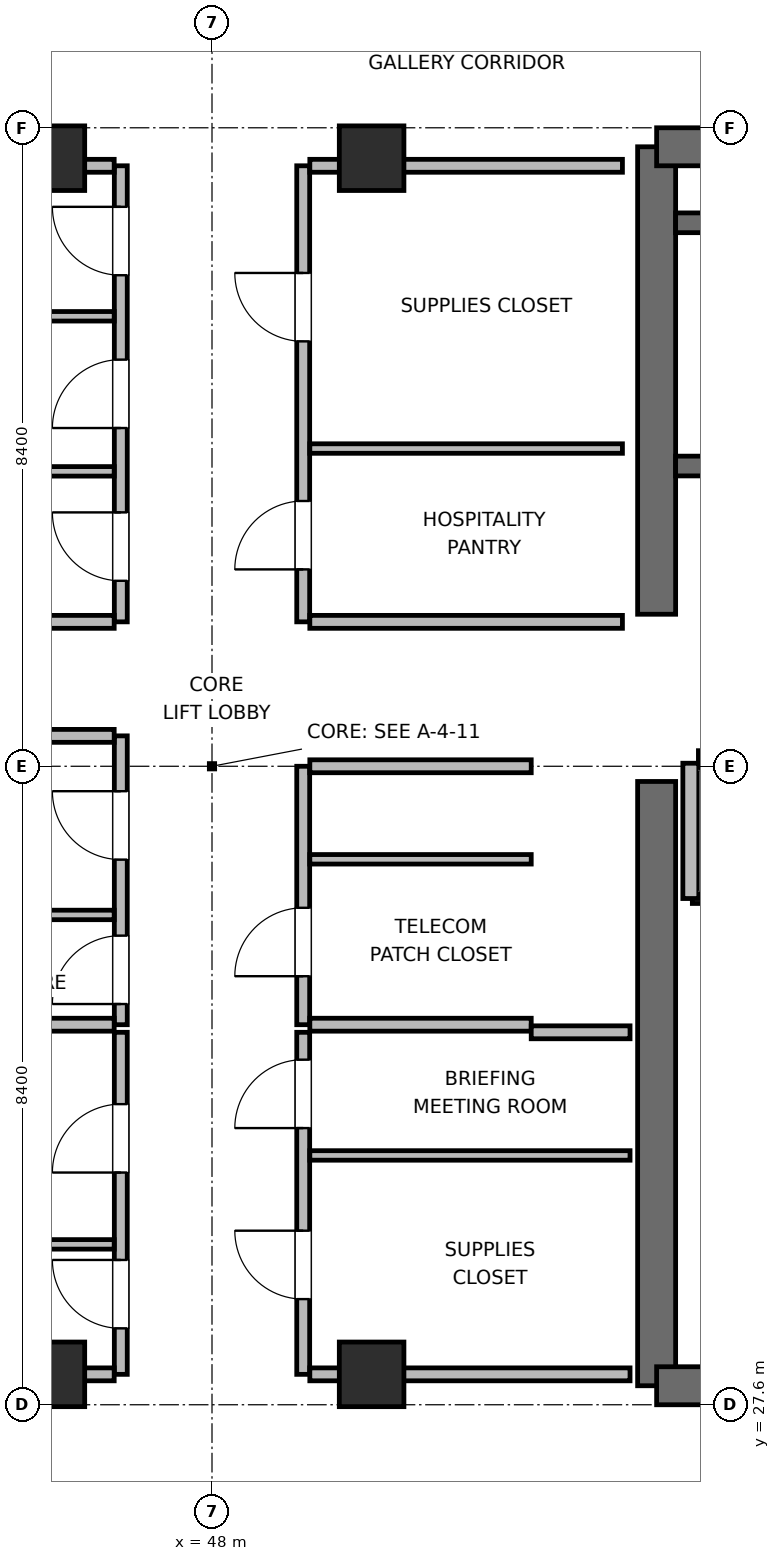
"""IFC4 building model, lengths in metres.
Left out: names, types, materials, properties, quantities, classifications, styles, units other than length and angle.
Written with IfcOpenShell. Run it as: python <this file> out.ifc"""

import sys

from ifc_helpers import new_model, si_unit, direction, frame, frame_2d, origin, origin_2d, place, context, subcontext, project, spatial, rectangle, extrude, element, fill, save


model = new_model("IFC4")
c1 = context("Model", 3, precision=1e-05, world=origin(), true_north=direction((0.0, 1.0)))
c2 = subcontext(c1, "Body", "Model", "MODEL_VIEW")
j1 = project(units=[si_unit("LENGTHUNIT", "METRE"), si_unit("PLANEANGLEUNIT", "RADIAN")], contexts=[c1])
p1 = place(None, origin())
s1 = spatial("IfcSite", under=j1, at=p1, CompositionType="ELEMENT")
p2 = place(p1, origin())
s2 = spatial("IfcBuilding", under=s1, at=p2, CompositionType="ELEMENT")
p3 = place(p2, frame((0.0, 0.0, 278.4)))
s3 = spatial("IfcBuildingStorey", under=s2, at=p3, CompositionType="ELEMENT", Elevation=278.4)
p4 = place(p3, frame((53.85, 27.85, 0.0), z_axis=(0.0, 0.0, 1.0), x_axis=(0.0, 1.0, 0.0)))
e1 = element("IfcWall", 1, at=p4, inside=s3, PredefinedType="SHEAR", context=c2, shape_type="SweptSolid", body=[
    extrude(rectangle(XDim=7.95, YDim=0.5, at=frame_2d((3.975, 0.0))), origin(), (0.0, 0.0, 1.0), 3.9),
])
p5 = place(p3, frame((53.85, 38.0, 0.0), z_axis=(0.0, 0.0, 1.0), x_axis=(0.0, 1.0, 0.0)))
e2 = element("IfcWall", 2, at=p5, inside=s3, PredefinedType="SHEAR", context=c2, shape_type="SweptSolid", body=[
    extrude(rectangle(XDim=6.15, YDim=0.5, at=frame_2d((3.075, 0.0))), origin(), (0.0, 0.0, 1.0), 3.9),
])
p6 = place(p3, frame((53.85, 27.85, 0.0), z_axis=(0.0, 0.0, 1.0), x_axis=(1.0, 0.0, 0.0)))
e3 = element("IfcWall", 3, at=p6, inside=s3, PredefinedType="SHEAR", context=c2, shape_type="SweptSolid", body=[
    extrude(rectangle(XDim=9.5, YDim=0.5, at=frame_2d((4.75, 0.0))), origin(), (0.0, 0.0, 1.0), 3.9),
])
p7 = place(p6, frame((4.025, 0.0, 0.0)))
e4 = element("IfcOpeningElement", 4, at=p7, cuts=e3, PredefinedType="OPENING", context=c2, shape_type="SweptSolid", body=[
    extrude(rectangle(XDim=1.05, YDim=2.04, at=frame_2d((0.525, 1.02))), frame((0.0, 0.26, 0.0), z_axis=(0.0, -1.0, 0.0), x_axis=(1.0, 0.0, 0.0)), (0.0, 0.0, 1.0), 0.52),
])
p8 = place(p3, frame((53.85, 44.15, 0.0), z_axis=(0.0, 0.0, 1.0), x_axis=(1.0, 0.0, 0.0)))
e5 = element("IfcWall", 5, at=p8, inside=s3, PredefinedType="SHEAR", context=c2, shape_type="SweptSolid", body=[
    extrude(rectangle(XDim=9.5, YDim=0.5, at=frame_2d((4.75, 0.0))), origin(), (0.0, 0.0, 1.0), 3.9),
])
p9 = place(p3, frame((54.1, 39.95, 0.0), z_axis=(0.0, 0.0, 1.0), x_axis=(1.0, 0.0, 0.0)))
e6 = element("IfcWall", 6, at=p9, inside=s3, PredefinedType="SHEAR", context=c2, shape_type="SweptSolid", body=[
    extrude(rectangle(XDim=9.0, YDim=0.26, at=frame_2d((4.5, 0.0))), origin(), (0.0, 0.0, 1.0), 3.9),
])
p10 = place(p9, frame((1.1, 0.0, 0.0)))
e7 = element("IfcOpeningElement", 7, at=p10, cuts=e6, PredefinedType="OPENING", context=c2, shape_type="SweptSolid", body=[
    extrude(rectangle(XDim=1.0, YDim=2.04, at=frame_2d((0.5, 1.02))), frame((0.0, 0.14, 0.0), z_axis=(0.0, -1.0, 0.0), x_axis=(1.0, 0.0, 0.0)), (0.0, 0.0, 1.0), 0.28),
])
p11 = place(p3, frame((54.1, 43.15, 0.0), z_axis=(0.0, 0.0, 1.0), x_axis=(1.0, 0.0, 0.0)))
e8 = element("IfcWall", 8, at=p11, inside=s3, PredefinedType="SHEAR", context=c2, shape_type="SweptSolid", body=[
    extrude(rectangle(XDim=9.0, YDim=0.26, at=frame_2d((4.5, 0.0))), origin(), (0.0, 0.0, 1.0), 3.9),
])
for number, where, z_axis, x_axis in (
    (9, (45.9, 28.0, 0.0), (0.0, 0.0, 1.0), (1.0, 0.0, 0.0)),
    (10, (50.1, 28.0, 0.0), (0.0, 0.0, 1.0), (1.0, 0.0, 0.0)),
    (11, (45.9, 44.0, 0.0), (0.0, 0.0, 1.0), (1.0, 0.0, 0.0)),
    (12, (50.1, 44.0, 0.0), (0.0, 0.0, 1.0), (1.0, 0.0, 0.0)),
):
    element("IfcColumn", number, at=place(p3, frame(where, z_axis=z_axis, x_axis=x_axis)), inside=s3, PredefinedType="COLUMN", context=c2, shape_type="SweptSolid", body=[
        extrude(rectangle(XDim=0.85, YDim=0.85, at=origin_2d()), origin(), (0.0, 0.0, 1.0), 3.9),
    ])
p12 = place(p3, frame((54.32, 34.3, 0.0), z_axis=(0.0, 0.0, 1.0), x_axis=(1.0, 0.0, 0.0)))
e13 = element("IfcWall", 13, at=p12, inside=s3, PredefinedType="PARTITIONING", context=c2, shape_type="SweptSolid", body=[
    extrude(rectangle(XDim=3.48, YDim=0.21, at=frame_2d((1.74, 0.0))), origin(), (0.0, 0.0, 1.0), 3.6),
])
p13 = place(p3, frame((54.4, 36.1, 0.0), z_axis=(0.0, 0.0, 1.0), x_axis=(1.0, 0.0, 0.0)))
e14 = element("IfcWall", 14, at=p13, inside=s3, PredefinedType="PARTITIONING", context=c2, shape_type="SweptSolid", body=[
    extrude(rectangle(XDim=2.1, YDim=0.21, at=frame_2d((1.05, 0.0))), origin(), (0.0, 0.0, 1.0), 3.6),
])
p14 = place(p13, frame((0.5, 0.0, 0.0)))
e15 = element("IfcOpeningElement", 15, at=p14, cuts=e14, PredefinedType="OPENING", context=c2, shape_type="SweptSolid", body=[
    extrude(rectangle(XDim=1.1, YDim=2.04, at=frame_2d((0.55, 1.02))), frame((0.0, 0.115, 0.0), z_axis=(0.0, -1.0, 0.0), x_axis=(1.0, 0.0, 0.0)), (0.0, 0.0, 1.0), 0.23),
])
p15 = place(p3, frame((54.3, 34.26, 0.0), z_axis=(0.0, 0.0, 1.0), x_axis=(0.0, 1.0, 0.0)))
e16 = element("IfcWall", 16, at=p15, inside=s3, PredefinedType="PARTITIONING", context=c2, shape_type="SweptSolid", body=[
    extrude(rectangle(XDim=1.78, YDim=0.21, at=frame_2d((0.89, 0.0))), origin(), (0.0, 0.0, 1.0), 3.6),
])
p16 = place(p3, frame((46.8, 32.6, 0.0), z_axis=(0.0, 0.0, 1.0), x_axis=(0.0, 1.0, 0.0)))
e17 = element("IfcWall", 17, at=p16, inside=s3, PredefinedType="PARTITIONING", context=c2, shape_type="SweptSolid", body=[
    extrude(rectangle(XDim=3.8, YDim=0.17, at=frame_2d((1.9, 0.0))), origin(), (0.0, 0.0, 1.0), 3.6),
])
p17 = place(p16, frame((0.272, 0.0, 0.0)))
e18 = element("IfcOpeningElement", 18, at=p17, cuts=e17, PredefinedType="OPENING", context=c2, shape_type="SweptSolid", body=[
    extrude(rectangle(XDim=0.9, YDim=2.02, at=frame_2d((0.45, 1.01))), frame((0.0, 0.095, 0.0), z_axis=(0.0, -1.0, 0.0), x_axis=(1.0, 0.0, 0.0)), (0.0, 0.0, 1.0), 0.19),
])
p18 = place(p16, frame((2.172, 0.0, 0.0)))
e19 = element("IfcOpeningElement", 19, at=p18, cuts=e17, PredefinedType="OPENING", context=c2, shape_type="SweptSolid", body=[
    extrude(rectangle(XDim=0.9, YDim=2.02, at=frame_2d((0.45, 1.01))), frame((0.0, 0.095, 0.0), z_axis=(0.0, -1.0, 0.0), x_axis=(1.0, 0.0, 0.0)), (0.0, 0.0, 1.0), 0.19),
])
for number, where, z_axis, x_axis in (
    (20, (43.8, 32.6, 0.0), (0.0, 0.0, 1.0), (1.0, 0.0, 0.0)),
    (21, (43.8, 36.4, 0.0), (0.0, 0.0, 1.0), (1.0, 0.0, 0.0)),
):
    element("IfcWall", number, at=place(p3, frame(where, z_axis=z_axis, x_axis=x_axis)), inside=s3, PredefinedType="PARTITIONING", context=c2, shape_type="SweptSolid", body=[
        extrude(rectangle(XDim=2.913, YDim=0.17, at=frame_2d((1.457, 0.0))), origin(), (0.0, 0.0, 1.0), 3.6),
    ])
p19 = place(p3, frame((43.8, 34.044, 0.0), z_axis=(0.0, 0.0, 1.0), x_axis=(1.0, 0.0, 0.0)))
e22 = element("IfcWall", 22, at=p19, inside=s3, PredefinedType="PARTITIONING", context=c2, shape_type="SweptSolid", body=[
    extrude(rectangle(XDim=2.913, YDim=0.125, at=frame_2d((1.457, 0.0))), origin(), (0.0, 0.0, 1.0), 3.6),
])
p20 = place(p3, frame((49.2, 32.6, 0.0), z_axis=(0.0, 0.0, 1.0), x_axis=(0.0, 1.0, 0.0)))
e23 = element("IfcWall", 23, at=p20, inside=s3, PredefinedType="PARTITIONING", context=c2, shape_type="SweptSolid", body=[
    extrude(rectangle(XDim=3.4, YDim=0.17, at=frame_2d((1.7, 0.0))), origin(), (0.0, 0.0, 1.0), 3.6),
])
p21 = place(p20, frame((0.638, 0.0, 0.0)))
e24 = element("IfcOpeningElement", 24, at=p21, cuts=e23, PredefinedType="OPENING", context=c2, shape_type="SweptSolid", body=[
    extrude(rectangle(XDim=0.9, YDim=2.02, at=frame_2d((0.45, 1.01))), frame((0.0, 0.095, 0.0), z_axis=(0.0, -1.0, 0.0), x_axis=(1.0, 0.0, 0.0)), (0.0, 0.0, 1.0), 0.19),
])
for number, where, z_axis, x_axis in (
    (25, (49.287, 32.6, 0.0), (0.0, 0.0, 1.0), (1.0, 0.0, 0.0)),
    (26, (49.287, 36.0, 0.0), (0.0, 0.0, 1.0), (1.0, 0.0, 0.0)),
):
    element("IfcWall", number, at=place(p3, frame(where, z_axis=z_axis, x_axis=x_axis)), inside=s3, PredefinedType="PARTITIONING", context=c2, shape_type="SweptSolid", body=[
        extrude(rectangle(XDim=2.913, YDim=0.17, at=frame_2d((1.457, 0.0))), origin(), (0.0, 0.0, 1.0), 3.6),
    ])
p22 = place(p3, frame((49.287, 34.776, 0.0), z_axis=(0.0, 0.0, 1.0), x_axis=(1.0, 0.0, 0.0)))
e27 = element("IfcWall", 27, at=p22, inside=s3, PredefinedType="PARTITIONING", context=c2, shape_type="SweptSolid", body=[
    extrude(rectangle(XDim=2.913, YDim=0.125, at=frame_2d((1.457, 0.0))), origin(), (0.0, 0.0, 1.0), 3.6),
])
p23 = place(p3, frame((46.8, 28.0, 0.0), z_axis=(0.0, 0.0, 1.0), x_axis=(0.0, 1.0, 0.0)))
e28 = element("IfcWall", 28, at=p23, inside=s3, PredefinedType="PARTITIONING", context=c2, shape_type="SweptSolid", body=[
    extrude(rectangle(XDim=4.5, YDim=0.17, at=frame_2d((2.25, 0.0))), origin(), (0.0, 0.0, 1.0), 3.6),
])
p24 = place(p23, frame((0.605, 0.0, 0.0)))
e29 = element("IfcOpeningElement", 29, at=p24, cuts=e28, PredefinedType="OPENING", context=c2, shape_type="SweptSolid", body=[
    extrude(rectangle(XDim=0.9, YDim=2.02, at=frame_2d((0.45, 1.01))), frame((0.0, 0.095, 0.0), z_axis=(0.0, -1.0, 0.0), x_axis=(1.0, 0.0, 0.0)), (0.0, 0.0, 1.0), 0.19),
])
p25 = place(p23, frame((2.655, 0.0, 0.0)))
e30 = element("IfcOpeningElement", 30, at=p25, cuts=e28, PredefinedType="OPENING", context=c2, shape_type="SweptSolid", body=[
    extrude(rectangle(XDim=0.9, YDim=2.02, at=frame_2d((0.45, 1.01))), frame((0.0, 0.095, 0.0), z_axis=(0.0, -1.0, 0.0), x_axis=(1.0, 0.0, 0.0)), (0.0, 0.0, 1.0), 0.19),
])
p26 = place(p3, frame((42.5, 28.0, 0.0), z_axis=(0.0, 0.0, 1.0), x_axis=(1.0, 0.0, 0.0)))
e31 = element("IfcWall", 31, at=p26, inside=s3, PredefinedType="PARTITIONING", context=c2, shape_type="SweptSolid", body=[
    extrude(rectangle(XDim=4.213, YDim=0.17, at=frame_2d((2.106, 0.0))), origin(), (0.0, 0.0, 1.0), 2.685),
])
p27 = place(p3, frame((42.5, 29.71, 0.0), z_axis=(0.0, 0.0, 1.0), x_axis=(1.0, 0.0, 0.0)))
e32 = element("IfcWall", 32, at=p27, inside=s3, PredefinedType="PARTITIONING", context=c2, shape_type="SweptSolid", body=[
    extrude(rectangle(XDim=4.213, YDim=0.125, at=frame_2d((2.106, 0.0))), origin(), (0.0, 0.0, 1.0), 3.6),
])
p28 = place(p3, frame((49.2, 28.0, 0.0), z_axis=(0.0, 0.0, 1.0), x_axis=(0.0, 1.0, 0.0)))
e33 = element("IfcWall", 33, at=p28, inside=s3, PredefinedType="PARTITIONING", context=c2, shape_type="SweptSolid", body=[
    extrude(rectangle(XDim=4.5, YDim=0.17, at=frame_2d((2.25, 0.0))), origin(), (0.0, 0.0, 1.0), 3.6),
])
p29 = place(p28, frame((0.99, 0.0, 0.0)))
e34 = element("IfcOpeningElement", 34, at=p29, cuts=e33, PredefinedType="OPENING", context=c2, shape_type="SweptSolid", body=[
    extrude(rectangle(XDim=0.9, YDim=2.02, at=frame_2d((0.45, 1.01))), frame((0.0, 0.095, 0.0), z_axis=(0.0, -1.0, 0.0), x_axis=(1.0, 0.0, 0.0)), (0.0, 0.0, 1.0), 0.19),
])
p30 = place(p28, frame((3.24, 0.0, 0.0)))
e35 = element("IfcOpeningElement", 35, at=p30, cuts=e33, PredefinedType="OPENING", context=c2, shape_type="SweptSolid", body=[
    extrude(rectangle(XDim=0.9, YDim=2.02, at=frame_2d((0.45, 1.01))), frame((0.0, 0.095, 0.0), z_axis=(0.0, -1.0, 0.0), x_axis=(1.0, 0.0, 0.0)), (0.0, 0.0, 1.0), 0.19),
])
p31 = place(p3, frame((49.287, 28.0, 0.0), z_axis=(0.0, 0.0, 1.0), x_axis=(1.0, 0.0, 0.0)))
e36 = element("IfcWall", 36, at=p31, inside=s3, PredefinedType="PARTITIONING", context=c2, shape_type="SweptSolid", body=[
    extrude(rectangle(XDim=4.213, YDim=0.17, at=frame_2d((2.106, 0.0))), origin(), (0.0, 0.0, 1.0), 2.685),
])
p32 = place(p3, frame((52.2, 32.5, 0.0), z_axis=(0.0, 0.0, 1.0), x_axis=(1.0, 0.0, 0.0)))
e37 = element("IfcWall", 37, at=p32, inside=s3, PredefinedType="PARTITIONING", context=c2, shape_type="SweptSolid", body=[
    extrude(rectangle(XDim=1.3, YDim=0.17, at=frame_2d((0.65, 0.0))), origin(), (0.0, 0.0, 1.0), 3.6),
])
p33 = place(p3, frame((49.287, 30.88, 0.0), z_axis=(0.0, 0.0, 1.0), x_axis=(1.0, 0.0, 0.0)))
e38 = element("IfcWall", 38, at=p33, inside=s3, PredefinedType="PARTITIONING", context=c2, shape_type="SweptSolid", body=[
    extrude(rectangle(XDim=4.213, YDim=0.125, at=frame_2d((2.106, 0.0))), origin(), (0.0, 0.0, 1.0), 3.6),
])
p34 = place(p3, frame((46.8, 37.9, 0.0), z_axis=(0.0, 0.0, 1.0), x_axis=(0.0, 1.0, 0.0)))
e39 = element("IfcWall", 39, at=p34, inside=s3, PredefinedType="PARTITIONING", context=c2, shape_type="SweptSolid", body=[
    extrude(rectangle(XDim=6.0, YDim=0.17, at=frame_2d((3.0, 0.0))), origin(), (0.0, 0.0, 1.0), 3.6),
])
p35 = place(p34, frame((0.54, 0.0, 0.0)))
e40 = element("IfcOpeningElement", 40, at=p35, cuts=e39, PredefinedType="OPENING", context=c2, shape_type="SweptSolid", body=[
    extrude(rectangle(XDim=0.9, YDim=2.02, at=frame_2d((0.45, 1.01))), frame((0.0, 0.095, 0.0), z_axis=(0.0, -1.0, 0.0), x_axis=(1.0, 0.0, 0.0)), (0.0, 0.0, 1.0), 0.19),
])
p36 = place(p34, frame((2.55, 0.0, 0.0)))
e41 = element("IfcOpeningElement", 41, at=p36, cuts=e39, PredefinedType="OPENING", context=c2, shape_type="SweptSolid", body=[
    extrude(rectangle(XDim=0.9, YDim=2.02, at=frame_2d((0.45, 1.01))), frame((0.0, 0.095, 0.0), z_axis=(0.0, -1.0, 0.0), x_axis=(1.0, 0.0, 0.0)), (0.0, 0.0, 1.0), 0.19),
])
p37 = place(p34, frame((4.56, 0.0, 0.0)))
e42 = element("IfcOpeningElement", 42, at=p37, cuts=e39, PredefinedType="OPENING", context=c2, shape_type="SweptSolid", body=[
    extrude(rectangle(XDim=0.9, YDim=2.02, at=frame_2d((0.45, 1.01))), frame((0.0, 0.095, 0.0), z_axis=(0.0, -1.0, 0.0), x_axis=(1.0, 0.0, 0.0)), (0.0, 0.0, 1.0), 0.19),
])
p38 = place(p3, frame((42.5, 37.9, 0.0), z_axis=(0.0, 0.0, 1.0), x_axis=(1.0, 0.0, 0.0)))
e43 = element("IfcWall", 43, at=p38, inside=s3, PredefinedType="PARTITIONING", context=c2, shape_type="SweptSolid", body=[
    extrude(rectangle(XDim=4.213, YDim=0.17, at=frame_2d((2.106, 0.0))), origin(), (0.0, 0.0, 1.0), 3.6),
])
p39 = place(p3, frame((42.5, 43.9, 0.0), z_axis=(0.0, 0.0, 1.0), x_axis=(1.0, 0.0, 0.0)))
e44 = element("IfcWall", 44, at=p39, inside=s3, PredefinedType="PARTITIONING", context=c2, shape_type="SweptSolid", body=[
    extrude(rectangle(XDim=4.213, YDim=0.17, at=frame_2d((2.106, 0.0))), origin(), (0.0, 0.0, 1.0), 2.685),
])
for number, where, z_axis, x_axis in (
    (45, (42.5, 39.88, 0.0), (0.0, 0.0, 1.0), (1.0, 0.0, 0.0)),
    (46, (42.5, 41.92, 0.0), (0.0, 0.0, 1.0), (1.0, 0.0, 0.0)),
):
    element("IfcWall", number, at=place(p3, frame(where, z_axis=z_axis, x_axis=x_axis)), inside=s3, PredefinedType="PARTITIONING", context=c2, shape_type="SweptSolid", body=[
        extrude(rectangle(XDim=4.213, YDim=0.125, at=frame_2d((2.106, 0.0))), origin(), (0.0, 0.0, 1.0), 3.6),
    ])
p40 = place(p3, frame((49.2, 37.9, 0.0), z_axis=(0.0, 0.0, 1.0), x_axis=(0.0, 1.0, 0.0)))
e47 = element("IfcWall", 47, at=p40, inside=s3, PredefinedType="PARTITIONING", context=c2, shape_type="SweptSolid", body=[
    extrude(rectangle(XDim=6.0, YDim=0.17, at=frame_2d((3.0, 0.0))), origin(), (0.0, 0.0, 1.0), 3.6),
])
p41 = place(p40, frame((0.69, 0.0, 0.0)))
e48 = element("IfcOpeningElement", 48, at=p41, cuts=e47, PredefinedType="OPENING", context=c2, shape_type="SweptSolid", body=[
    extrude(rectangle(XDim=0.9, YDim=2.02, at=frame_2d((0.45, 1.01))), frame((0.0, 0.095, 0.0), z_axis=(0.0, -1.0, 0.0), x_axis=(1.0, 0.0, 0.0)), (0.0, 0.0, 1.0), 0.19),
])
p42 = place(p40, frame((3.69, 0.0, 0.0)))
e49 = element("IfcOpeningElement", 49, at=p42, cuts=e47, PredefinedType="OPENING", context=c2, shape_type="SweptSolid", body=[
    extrude(rectangle(XDim=0.9, YDim=2.02, at=frame_2d((0.45, 1.01))), frame((0.0, 0.095, 0.0), z_axis=(0.0, -1.0, 0.0), x_axis=(1.0, 0.0, 0.0)), (0.0, 0.0, 1.0), 0.19),
])
p43 = place(p3, frame((49.287, 37.9, 0.0), z_axis=(0.0, 0.0, 1.0), x_axis=(1.0, 0.0, 0.0)))
e50 = element("IfcWall", 50, at=p43, inside=s3, PredefinedType="PARTITIONING", context=c2, shape_type="SweptSolid", body=[
    extrude(rectangle(XDim=4.113, YDim=0.17, at=frame_2d((2.056, 0.0))), origin(), (0.0, 0.0, 1.0), 3.6),
])
p44 = place(p3, frame((49.287, 43.9, 0.0), z_axis=(0.0, 0.0, 1.0), x_axis=(1.0, 0.0, 0.0)))
e51 = element("IfcWall", 51, at=p44, inside=s3, PredefinedType="PARTITIONING", context=c2, shape_type="SweptSolid", body=[
    extrude(rectangle(XDim=4.113, YDim=0.17, at=frame_2d((2.056, 0.0))), origin(), (0.0, 0.0, 1.0), 2.685),
])
p45 = place(p3, frame((49.287, 40.18, 0.0), z_axis=(0.0, 0.0, 1.0), x_axis=(1.0, 0.0, 0.0)))
e52 = element("IfcWall", 52, at=p45, inside=s3, PredefinedType="PARTITIONING", context=c2, shape_type="SweptSolid", body=[
    extrude(rectangle(XDim=4.113, YDim=0.125, at=frame_2d((2.056, 0.0))), origin(), (0.0, 0.0, 1.0), 3.6),
])
p46 = place(p17, origin())
e53 = element("IfcDoor", 53, at=p46, inside=s3, OperationType="SINGLE_SWING_LEFT", PredefinedType="DOOR", context=c2, shape_type="SweptSolid", body=[
    extrude(rectangle(XDim=0.9, YDim=2.02, at=frame_2d((0.45, 1.01))), frame((0.0, 0.025, 0.0), z_axis=(0.0, -1.0, 0.0), x_axis=(1.0, 0.0, 0.0)), (0.0, 0.0, 1.0), 0.05),
])
fill(e18, e53)
p47 = place(p18, origin())
e54 = element("IfcDoor", 54, at=p47, inside=s3, OperationType="SINGLE_SWING_RIGHT", PredefinedType="DOOR", context=c2, shape_type="SweptSolid", body=[
    extrude(rectangle(XDim=0.9, YDim=2.02, at=frame_2d((0.45, 1.01))), frame((0.0, 0.025, 0.0), z_axis=(0.0, -1.0, 0.0), x_axis=(1.0, 0.0, 0.0)), (0.0, 0.0, 1.0), 0.05),
])
fill(e19, e54)
p48 = place(p21, origin())
e55 = element("IfcDoor", 55, at=p48, inside=s3, OperationType="SINGLE_SWING_LEFT", PredefinedType="DOOR", context=c2, shape_type="SweptSolid", body=[
    extrude(rectangle(XDim=0.9, YDim=2.02, at=frame_2d((0.45, 1.01))), frame((0.0, 0.025, 0.0), z_axis=(0.0, -1.0, 0.0), x_axis=(1.0, 0.0, 0.0)), (0.0, 0.0, 1.0), 0.05),
])
fill(e24, e55)
p49 = place(p24, origin())
e56 = element("IfcDoor", 56, at=p49, inside=s3, OperationType="SINGLE_SWING_RIGHT", PredefinedType="DOOR", context=c2, shape_type="SweptSolid", body=[
    extrude(rectangle(XDim=0.9, YDim=2.02, at=frame_2d((0.45, 1.01))), frame((0.0, 0.025, 0.0), z_axis=(0.0, -1.0, 0.0), x_axis=(1.0, 0.0, 0.0)), (0.0, 0.0, 1.0), 0.05),
])
fill(e29, e56)
p50 = place(p25, origin())
e57 = element("IfcDoor", 57, at=p50, inside=s3, OperationType="SINGLE_SWING_LEFT", PredefinedType="DOOR", context=c2, shape_type="SweptSolid", body=[
    extrude(rectangle(XDim=0.9, YDim=2.02, at=frame_2d((0.45, 1.01))), frame((0.0, 0.025, 0.0), z_axis=(0.0, -1.0, 0.0), x_axis=(1.0, 0.0, 0.0)), (0.0, 0.0, 1.0), 0.05),
])
fill(e30, e57)
p51 = place(p29, origin())
e58 = element("IfcDoor", 58, at=p51, inside=s3, OperationType="SINGLE_SWING_RIGHT", PredefinedType="DOOR", context=c2, shape_type="SweptSolid", body=[
    extrude(rectangle(XDim=0.9, YDim=2.02, at=frame_2d((0.45, 1.01))), frame((0.0, 0.025, 0.0), z_axis=(0.0, -1.0, 0.0), x_axis=(1.0, 0.0, 0.0)), (0.0, 0.0, 1.0), 0.05),
])
fill(e34, e58)
p52 = place(p30, origin())
e59 = element("IfcDoor", 59, at=p52, inside=s3, OperationType="SINGLE_SWING_LEFT", PredefinedType="DOOR", context=c2, shape_type="SweptSolid", body=[
    extrude(rectangle(XDim=0.9, YDim=2.02, at=frame_2d((0.45, 1.01))), frame((0.0, 0.025, 0.0), z_axis=(0.0, -1.0, 0.0), x_axis=(1.0, 0.0, 0.0)), (0.0, 0.0, 1.0), 0.05),
])
fill(e35, e59)
p53 = place(p35, origin())
e60 = element("IfcDoor", 60, at=p53, inside=s3, OperationType="SINGLE_SWING_RIGHT", PredefinedType="DOOR", context=c2, shape_type="SweptSolid", body=[
    extrude(rectangle(XDim=0.9, YDim=2.02, at=frame_2d((0.45, 1.01))), frame((0.0, 0.025, 0.0), z_axis=(0.0, -1.0, 0.0), x_axis=(1.0, 0.0, 0.0)), (0.0, 0.0, 1.0), 0.05),
])
fill(e40, e60)
p54 = place(p36, origin())
e61 = element("IfcDoor", 61, at=p54, inside=s3, OperationType="SINGLE_SWING_LEFT", PredefinedType="DOOR", context=c2, shape_type="SweptSolid", body=[
    extrude(rectangle(XDim=0.9, YDim=2.02, at=frame_2d((0.45, 1.01))), frame((0.0, 0.025, 0.0), z_axis=(0.0, -1.0, 0.0), x_axis=(1.0, 0.0, 0.0)), (0.0, 0.0, 1.0), 0.05),
])
fill(e41, e61)
p55 = place(p37, origin())
e62 = element("IfcDoor", 62, at=p55, inside=s3, OperationType="SINGLE_SWING_RIGHT", PredefinedType="DOOR", context=c2, shape_type="SweptSolid", body=[
    extrude(rectangle(XDim=0.9, YDim=2.02, at=frame_2d((0.45, 1.01))), frame((0.0, 0.025, 0.0), z_axis=(0.0, -1.0, 0.0), x_axis=(1.0, 0.0, 0.0)), (0.0, 0.0, 1.0), 0.05),
])
fill(e42, e62)
p56 = place(p41, origin())
e63 = element("IfcDoor", 63, at=p56, inside=s3, OperationType="SINGLE_SWING_LEFT", PredefinedType="DOOR", context=c2, shape_type="SweptSolid", body=[
    extrude(rectangle(XDim=0.9, YDim=2.02, at=frame_2d((0.45, 1.01))), frame((0.0, 0.025, 0.0), z_axis=(0.0, -1.0, 0.0), x_axis=(1.0, 0.0, 0.0)), (0.0, 0.0, 1.0), 0.05),
])
fill(e48, e63)
p57 = place(p42, origin())
e64 = element("IfcDoor", 64, at=p57, inside=s3, OperationType="SINGLE_SWING_RIGHT", PredefinedType="DOOR", context=c2, shape_type="SweptSolid", body=[
    extrude(rectangle(XDim=0.9, YDim=2.02, at=frame_2d((0.45, 1.01))), frame((0.0, 0.025, 0.0), z_axis=(0.0, -1.0, 0.0), x_axis=(1.0, 0.0, 0.0)), (0.0, 0.0, 1.0), 0.05),
])
fill(e49, e64)
save(model, sys.argv[1])
